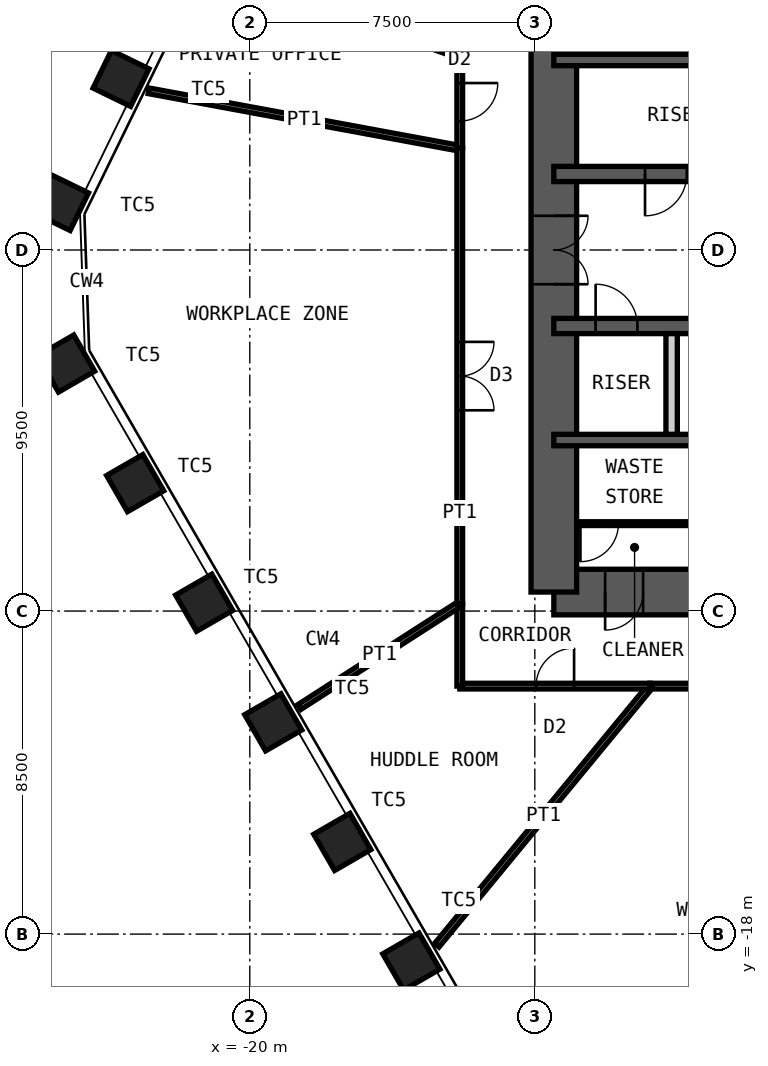
"""IFC4 building model, lengths in metres.
Left out: names, types, materials, properties, quantities, classifications, styles, units other than length and angle.
Written with IfcOpenShell. Run it as: python <this file> out.ifc"""

import sys

from ifc_helpers import new_model, si_unit, direction, frame, frame_2d, origin, origin_2d, place, context, subcontext, project, spatial, rectangle, hollow_rectangle, extrude, element, fill, save


model = new_model("IFC4")
c1 = context("Model", 3, precision=1e-05, world=origin(), true_north=direction((0.0, 1.0)))
c2 = subcontext(c1, "Body", "Model", "MODEL_VIEW")
j1 = project(units=[si_unit("LENGTHUNIT", "METRE"), si_unit("PLANEANGLEUNIT", "RADIAN")], contexts=[c1])
p1 = place(None, origin())
s1 = spatial("IfcSite", under=j1, at=p1, CompositionType="ELEMENT")
p2 = place(p1, origin())
s2 = spatial("IfcBuilding", under=s1, at=p2, CompositionType="ELEMENT")
p3 = place(p2, frame((0.0, 0.0, 188.8)))
s3 = spatial("IfcBuildingStorey", under=s2, at=p3, CompositionType="ELEMENT", Elevation=188.8)
for number, where, z_axis, x_axis in (
    (1, (-15.749, -18.721, 0.0), (0.0, 0.0, 1.0), (0.5, -0.866, 0.0)),
    (2, (-17.566, -15.574, 0.0), (0.0, 0.0, 1.0), (0.5, -0.866, 0.0)),
    (3, (-19.383, -12.428, 0.0), (0.0, 0.0, 1.0), (0.5, -0.866, 0.0)),
    (4, (-21.2, -9.281, 0.0), (0.0, 0.0, 1.0), (0.5, -0.866, 0.0)),
    (5, (-23.016, -6.134, 0.0), (0.0, 0.0, 1.0), (0.5, -0.866, 0.0)),
    (6, (-24.833, -2.988, 0.0), (0.0, 0.0, 1.0), (0.5, -0.866, 0.0)),
    (7, (-24.981, 1.248, 0.0), (0.0, 0.0, 1.0), (-0.438, -0.899, 0.0)),
    (8, (-23.388, 4.514, 0.0), (0.0, 0.0, 1.0), (-0.438, -0.899, 0.0)),
):
    element("IfcColumn", number, at=place(p3, frame(where, z_axis=z_axis, x_axis=x_axis)), inside=s3, PredefinedType="COLUMN", context=c2, shape_type="SweptSolid", body=[
        extrude(hollow_rectangle(XDim=1.1, YDim=1.1, WallThickness=0.07, at=origin_2d()), origin(), (0.0, 0.0, 1.0), 4.2),
    ])
p4 = place(p3, frame((-12.0, -9.0, 0.0), z_axis=(0.0, 0.0, 1.0), x_axis=(1.0, 0.0, 0.0)))
e9 = element("IfcWall", 9, at=p4, inside=s3, PredefinedType="SHEAR", context=c2, shape_type="SweptSolid", body=[
    extrude(rectangle(XDim=24.0, YDim=1.2, at=frame_2d((12.0, 0.0))), origin(), (0.0, 0.0, 1.0), 4.2),
])
p5 = place(p4, frame((1.35, 0.0, 0.0)))
e10 = element("IfcOpeningElement", 10, at=p5, cuts=e9, PredefinedType="OPENING", context=c2, shape_type="SweptSolid", body=[
    extrude(rectangle(XDim=1.0, YDim=2.1, at=frame_2d((0.5, 1.05))), frame((0.0, 0.61, 0.0), z_axis=(0.0, -1.0, 0.0), x_axis=(1.0, 0.0, 0.0)), (0.0, 0.0, 1.0), 1.22),
])
p6 = place(p4, frame((5.325, 0.0, 0.0)))
e11 = element("IfcOpeningElement", 11, at=p6, cuts=e9, PredefinedType="OPENING", context=c2, shape_type="SweptSolid", body=[
    extrude(rectangle(XDim=1.15, YDim=2.1, at=frame_2d((0.575, 1.05))), frame((0.0, 0.61, 0.0), z_axis=(0.0, -1.0, 0.0), x_axis=(1.0, 0.0, 0.0)), (0.0, 0.0, 1.0), 1.22),
])
p7 = place(p4, frame((12.6, 0.0, 0.0)))
e12 = element("IfcOpeningElement", 12, at=p7, cuts=e9, PredefinedType="OPENING", context=c2, shape_type="SweptSolid", body=[
    extrude(rectangle(XDim=1.0, YDim=2.1, at=frame_2d((0.5, 1.05))), frame((0.0, 0.61, 0.0), z_axis=(0.0, -1.0, 0.0), x_axis=(1.0, 0.0, 0.0)), (0.0, 0.0, 1.0), 1.22),
])
p8 = place(p3, frame((-12.0, -9.0, 0.0), z_axis=(0.0, 0.0, 1.0), x_axis=(0.0, 1.0, 0.0)))
e13 = element("IfcWall", 13, at=p8, inside=s3, PredefinedType="SHEAR", context=c2, shape_type="SweptSolid", body=[
    extrude(rectangle(XDim=18.0, YDim=1.2, at=frame_2d((9.0, 0.0))), origin(), (0.0, 0.0, 1.0), 4.2),
])
p9 = place(p8, frame((8.1, 0.0, 0.0)))
e14 = element("IfcOpeningElement", 14, at=p9, cuts=e13, PredefinedType="OPENING", context=c2, shape_type="SweptSolid", body=[
    extrude(rectangle(XDim=1.8, YDim=2.1, at=frame_2d((0.9, 1.05))), frame((0.0, 0.61, 0.0), z_axis=(0.0, -1.0, 0.0), x_axis=(1.0, 0.0, 0.0)), (0.0, 0.0, 1.0), 1.22),
])
p10 = place(p3, frame((-12.0, 5.0, 0.0), z_axis=(0.0, 0.0, 1.0), x_axis=(1.0, 0.0, 0.0)))
e15 = element("IfcWall", 15, at=p10, inside=s3, PredefinedType="SHEAR", context=c2, shape_type="SweptSolid", body=[
    extrude(rectangle(XDim=24.0, YDim=0.3, at=frame_2d((12.0, 0.0))), origin(), (0.0, 0.0, 1.0), 4.2),
])
p11 = place(p3, frame((-12.0, 2.0, 0.0), z_axis=(0.0, 0.0, 1.0), x_axis=(1.0, 0.0, 0.0)))
e16 = element("IfcWall", 16, at=p11, inside=s3, PredefinedType="SHEAR", context=c2, shape_type="SweptSolid", body=[
    extrude(rectangle(XDim=24.0, YDim=0.4, at=frame_2d((12.0, 0.0))), origin(), (0.0, 0.0, 1.0), 4.2),
])
p12 = place(p11, frame((2.4, 0.0, 0.0)))
e17 = element("IfcOpeningElement", 17, at=p12, cuts=e16, PredefinedType="OPENING", context=c2, shape_type="SweptSolid", body=[
    extrude(rectangle(XDim=1.1, YDim=2.1, at=frame_2d((0.55, 1.05))), frame((0.0, 0.21, 0.0), z_axis=(0.0, -1.0, 0.0), x_axis=(1.0, 0.0, 0.0)), (0.0, 0.0, 1.0), 0.42),
])
p13 = place(p11, frame((22.0, 0.0, 0.0)))
e18 = element("IfcOpeningElement", 18, at=p13, cuts=e16, PredefinedType="OPENING", context=c2, shape_type="SweptSolid", body=[
    extrude(rectangle(XDim=1.1, YDim=2.1, at=frame_2d((0.55, 1.05))), frame((0.0, 0.21, 0.0), z_axis=(0.0, -1.0, 0.0), x_axis=(1.0, 0.0, 0.0)), (0.0, 0.0, 1.0), 0.42),
])
p14 = place(p11, frame((10.15, 0.0, 0.0)))
e19 = element("IfcOpeningElement", 19, at=p14, cuts=e16, PredefinedType="OPENING", context=c2, shape_type="SweptSolid", body=[
    extrude(rectangle(XDim=1.0, YDim=2.1, at=frame_2d((0.5, 1.05))), frame((0.0, 0.21, 0.0), z_axis=(0.0, -1.0, 0.0), x_axis=(1.0, 0.0, 0.0)), (0.0, 0.0, 1.0), 0.42),
])
p15 = place(p11, frame((6.9, 0.0, 0.0)))
e20 = element("IfcOpeningElement", 20, at=p15, cuts=e16, PredefinedType="OPENING", context=c2, shape_type="SweptSolid", body=[
    extrude(rectangle(XDim=1.0, YDim=2.1, at=frame_2d((0.5, 1.05))), frame((0.0, 0.21, 0.0), z_axis=(0.0, -1.0, 0.0), x_axis=(1.0, 0.0, 0.0)), (0.0, 0.0, 1.0), 0.42),
])
p16 = place(p11, frame((13.35, 0.0, 0.0)))
e21 = element("IfcOpeningElement", 21, at=p16, cuts=e16, PredefinedType="OPENING", context=c2, shape_type="SweptSolid", body=[
    extrude(rectangle(XDim=1.1, YDim=2.4, at=frame_2d((0.55, 1.2))), frame((0.0, 0.21, 0.0), z_axis=(0.0, -1.0, 0.0), x_axis=(1.0, 0.0, 0.0)), (0.0, 0.0, 1.0), 0.42),
])
p17 = place(p11, frame((16.15, 0.0, 0.0)))
e22 = element("IfcOpeningElement", 22, at=p17, cuts=e16, PredefinedType="OPENING", context=c2, shape_type="SweptSolid", body=[
    extrude(rectangle(XDim=1.1, YDim=2.4, at=frame_2d((0.55, 1.2))), frame((0.0, 0.21, 0.0), z_axis=(0.0, -1.0, 0.0), x_axis=(1.0, 0.0, 0.0)), (0.0, 0.0, 1.0), 0.42),
])
p18 = place(p11, frame((18.95, 0.0, 0.0)))
e23 = element("IfcOpeningElement", 23, at=p18, cuts=e16, PredefinedType="OPENING", context=c2, shape_type="SweptSolid", body=[
    extrude(rectangle(XDim=1.1, YDim=2.4, at=frame_2d((0.55, 1.2))), frame((0.0, 0.21, 0.0), z_axis=(0.0, -1.0, 0.0), x_axis=(1.0, 0.0, 0.0)), (0.0, 0.0, 1.0), 0.42),
])
p19 = place(p3, frame((-12.0, -2.0, 0.0), z_axis=(0.0, 0.0, 1.0), x_axis=(1.0, 0.0, 0.0)))
e24 = element("IfcWall", 24, at=p19, inside=s3, PredefinedType="SHEAR", context=c2, shape_type="SweptSolid", body=[
    extrude(rectangle(XDim=24.0, YDim=0.4, at=frame_2d((12.0, 0.0))), origin(), (0.0, 0.0, 1.0), 4.2),
])
p20 = place(p19, frame((1.1, 0.0, 0.0)))
e25 = element("IfcOpeningElement", 25, at=p20, cuts=e24, PredefinedType="OPENING", context=c2, shape_type="SweptSolid", body=[
    extrude(rectangle(XDim=1.1, YDim=2.1, at=frame_2d((0.55, 1.05))), frame((0.0, 0.21, 0.0), z_axis=(0.0, -1.0, 0.0), x_axis=(1.0, 0.0, 0.0)), (0.0, 0.0, 1.0), 0.42),
])
p21 = place(p19, frame((13.55, 0.0, 0.0)))
e26 = element("IfcOpeningElement", 26, at=p21, cuts=e24, PredefinedType="OPENING", context=c2, shape_type="SweptSolid", body=[
    extrude(rectangle(XDim=1.1, YDim=2.1, at=frame_2d((0.55, 1.05))), frame((0.0, 0.21, 0.0), z_axis=(0.0, -1.0, 0.0), x_axis=(1.0, 0.0, 0.0)), (0.0, 0.0, 1.0), 0.42),
])
p22 = place(p19, frame((20.7, 0.0, 0.0)))
e27 = element("IfcOpeningElement", 27, at=p22, cuts=e24, PredefinedType="OPENING", context=c2, shape_type="SweptSolid", body=[
    extrude(rectangle(XDim=1.1, YDim=2.1, at=frame_2d((0.55, 1.05))), frame((0.0, 0.21, 0.0), z_axis=(0.0, -1.0, 0.0), x_axis=(1.0, 0.0, 0.0)), (0.0, 0.0, 1.0), 0.42),
])
p23 = place(p19, frame((4.0, 0.0, 0.0)))
e28 = element("IfcOpeningElement", 28, at=p23, cuts=e24, PredefinedType="OPENING", context=c2, shape_type="SweptSolid", body=[
    extrude(rectangle(XDim=1.0, YDim=2.1, at=frame_2d((0.5, 1.05))), frame((0.0, 0.21, 0.0), z_axis=(0.0, -1.0, 0.0), x_axis=(1.0, 0.0, 0.0)), (0.0, 0.0, 1.0), 0.42),
])
p24 = place(p19, frame((6.8, 0.0, 0.0)))
e29 = element("IfcOpeningElement", 29, at=p24, cuts=e24, PredefinedType="OPENING", context=c2, shape_type="SweptSolid", body=[
    extrude(rectangle(XDim=1.0, YDim=2.1, at=frame_2d((0.5, 1.05))), frame((0.0, 0.21, 0.0), z_axis=(0.0, -1.0, 0.0), x_axis=(1.0, 0.0, 0.0)), (0.0, 0.0, 1.0), 0.42),
])
p25 = place(p3, frame((-12.0, -5.0, 0.0), z_axis=(0.0, 0.0, 1.0), x_axis=(1.0, 0.0, 0.0)))
e30 = element("IfcWall", 30, at=p25, inside=s3, PredefinedType="SHEAR", context=c2, shape_type="SweptSolid", body=[
    extrude(rectangle(XDim=24.0, YDim=0.3, at=frame_2d((12.0, 0.0))), origin(), (0.0, 0.0, 1.0), 4.2),
])
p26 = place(p3, frame((-8.9, -4.85, 0.0), z_axis=(0.0, 0.0, 1.0), x_axis=(0.0, 1.0, 0.0)))
e31 = element("IfcWall", 31, at=p26, inside=s3, PredefinedType="PARTITIONING", context=c2, shape_type="SweptSolid", body=[
    extrude(rectangle(XDim=2.65, YDim=0.3, at=frame_2d((1.325, 0.0))), origin(), (0.0, 0.0, 1.0), 3.98),
])
p27 = place(p3, frame((-11.4, -7.2, 0.0), z_axis=(0.0, 0.0, 1.0), x_axis=(1.0, 0.0, 0.0)))
e32 = element("IfcWall", 32, at=p27, inside=s3, PredefinedType="PARTITIONING", context=c2, shape_type="SweptSolid", body=[
    extrude(rectangle(XDim=3.05, YDim=0.1, at=frame_2d((1.525, 0.0))), origin(), (0.0, 0.0, 1.0), 3.98),
])
p28 = place(p27, frame((0.1, 0.0, 0.0)))
e33 = element("IfcOpeningElement", 33, at=p28, cuts=e32, PredefinedType="OPENING", context=c2, shape_type="SweptSolid", body=[
    extrude(rectangle(XDim=1.0, YDim=2.4, at=frame_2d((0.5, 1.2))), frame((0.0, 0.06, 0.0), z_axis=(0.0, -1.0, 0.0), x_axis=(1.0, 0.0, 0.0)), (0.0, 0.0, 1.0), 0.12),
])
p29 = place(p3, frame((-22.661, 4.189, 0.0), z_axis=(0.0, 0.0, 1.0), x_axis=(0.983345347199, -0.181746879316, 0.0)))
e34 = element("IfcWall", 34, at=p29, inside=s3, PredefinedType="PARTITIONING", context=c2, shape_type="SweptSolid", body=[
    extrude(rectangle(XDim=8.324, YDim=0.15, at=frame_2d((4.162, 0.0))), origin(), (0.0, 0.0, 1.0), 3.43),
])
p30 = place(p3, frame((-14.475, 2.676, 0.0), z_axis=(0.0, 0.0, 1.0), x_axis=(0.0, 1.0, 0.0)))
e35 = element("IfcWall", 35, at=p30, inside=s3, PredefinedType="PARTITIONING", context=c2, shape_type="SweptSolid", body=[
    extrude(rectangle(XDim=2.435, YDim=0.15, at=frame_2d((1.217, 0.0))), origin(), (0.0, 0.0, 1.0), 4.03),
])
p31 = place(p30, frame((0.717, 0.0, 0.0)))
e36 = element("IfcOpeningElement", 36, at=p31, cuts=e35, PredefinedType="OPENING", context=c2, shape_type="SweptSolid", body=[
    extrude(rectangle(XDim=1.0, YDim=2.4, at=frame_2d((0.5, 1.2))), frame((0.0, 0.085, 0.0), z_axis=(0.0, -1.0, 0.0), x_axis=(1.0, 0.0, 0.0)), (0.0, 0.0, 1.0), 0.17),
])
p32 = place(p3, frame((-21.072, 7.439, 0.0), z_axis=(0.0, 0.0, 1.0), x_axis=(0.94295553867, -0.332918686907, 0.0)))
e37 = element("IfcWall", 37, at=p32, inside=s3, PredefinedType="PARTITIONING", context=c2, shape_type="SweptSolid", body=[
    extrude(rectangle(XDim=6.996, YDim=0.15, at=frame_2d((3.498, 0.0))), origin(), (0.0, 0.0, 1.0), 3.43),
])
p33 = place(p3, frame((-14.475, 5.11, 0.0), z_axis=(0.0, 0.0, 1.0), x_axis=(0.0, 1.0, 0.0)))
e38 = element("IfcWall", 38, at=p33, inside=s3, PredefinedType="PARTITIONING", context=c2, shape_type="SweptSolid", body=[
    extrude(rectangle(XDim=2.831, YDim=0.15, at=frame_2d((1.416, 0.0))), origin(), (0.0, 0.0, 1.0), 4.03),
])
p34 = place(p33, frame((0.916, 0.0, 0.0)))
e39 = element("IfcOpeningElement", 39, at=p34, cuts=e38, PredefinedType="OPENING", context=c2, shape_type="SweptSolid", body=[
    extrude(rectangle(XDim=1.0, YDim=2.4, at=frame_2d((0.5, 1.2))), frame((0.0, 0.085, 0.0), z_axis=(0.0, -1.0, 0.0), x_axis=(1.0, 0.0, 0.0)), (0.0, 0.0, 1.0), 0.17),
])
p35 = place(p3, frame((4.07, -11.475, 0.0), z_axis=(0.0, 0.0, 1.0), x_axis=(-1.0, 0.0, 0.0)))
e40 = element("IfcWall", 40, at=p35, inside=s3, PredefinedType="PARTITIONING", context=c2, shape_type="SweptSolid", body=[
    extrude(rectangle(XDim=13.528, YDim=0.15, at=frame_2d((6.764, 0.0))), origin(), (0.0, 0.0, 1.0), 4.03),
])
p36 = place(p35, frame((5.864, 0.0, 0.0)))
e41 = element("IfcOpeningElement", 41, at=p36, cuts=e40, PredefinedType="OPENING", context=c2, shape_type="SweptSolid", body=[
    extrude(rectangle(XDim=1.8, YDim=2.4, at=frame_2d((0.9, 1.2))), frame((0.0, 0.085, 0.0), z_axis=(0.0, -1.0, 0.0), x_axis=(1.0, 0.0, 0.0)), (0.0, 0.0, 1.0), 0.17),
])
p37 = place(p3, frame((-15.08, -18.294, 0.0), z_axis=(0.0, 0.0, 1.0), x_axis=(0.636052894953, 0.771645459277, 0.0)))
e42 = element("IfcWall", 42, at=p37, inside=s3, PredefinedType="PARTITIONING", context=c2, shape_type="SweptSolid", body=[
    extrude(rectangle(XDim=8.837, YDim=0.15, at=frame_2d((4.418, 0.0))), origin(), (0.0, 0.0, 1.0), 3.43),
])
p38 = place(p3, frame((-9.459, -11.475, 0.0), z_axis=(0.0, 0.0, 1.0), x_axis=(-1.0, 0.0, 0.0)))
e43 = element("IfcWall", 43, at=p38, inside=s3, PredefinedType="PARTITIONING", context=c2, shape_type="SweptSolid", body=[
    extrude(rectangle(XDim=5.016, YDim=0.15, at=frame_2d((2.508, 0.0))), origin(), (0.0, 0.0, 1.0), 4.03),
])
p39 = place(p38, frame((2.008, 0.0, 0.0)))
e44 = element("IfcOpeningElement", 44, at=p39, cuts=e43, PredefinedType="OPENING", context=c2, shape_type="SweptSolid", body=[
    extrude(rectangle(XDim=1.0, YDim=2.4, at=frame_2d((0.5, 1.2))), frame((0.0, 0.085, 0.0), z_axis=(0.0, -1.0, 0.0), x_axis=(1.0, 0.0, 0.0)), (0.0, 0.0, 1.0), 0.17),
])
p40 = place(p3, frame((-14.475, -11.475, 0.0), z_axis=(0.0, 0.0, 1.0), x_axis=(0.0, 1.0, 0.0)))
e45 = element("IfcWall", 45, at=p40, inside=s3, PredefinedType="PARTITIONING", context=c2, shape_type="SweptSolid", body=[
    extrude(rectangle(XDim=2.164, YDim=0.15, at=frame_2d((1.082, 0.0))), origin(), (0.0, 0.0, 1.0), 4.03),
])
p41 = place(p3, frame((-18.693, -12.024, 0.0), z_axis=(0.0, 0.0, 1.0), x_axis=(0.841031335058, 0.540986407824, 0.0)))
e46 = element("IfcWall", 46, at=p41, inside=s3, PredefinedType="PARTITIONING", context=c2, shape_type="SweptSolid", body=[
    extrude(rectangle(XDim=5.015, YDim=0.15, at=frame_2d((2.507, 0.0))), origin(), (0.0, 0.0, 1.0), 3.43),
])
p42 = place(p3, frame((-14.475, -9.311, 0.0), z_axis=(0.0, 0.0, 1.0), x_axis=(0.0, 1.0, 0.0)))
e47 = element("IfcWall", 47, at=p42, inside=s3, PredefinedType="PARTITIONING", context=c2, shape_type="SweptSolid", body=[
    extrude(rectangle(XDim=11.987, YDim=0.15, at=frame_2d((5.993, 0.0))), origin(), (0.0, 0.0, 1.0), 4.03),
])
p43 = place(p42, frame((5.093, 0.0, 0.0)))
e48 = element("IfcOpeningElement", 48, at=p43, cuts=e47, PredefinedType="OPENING", context=c2, shape_type="SweptSolid", body=[
    extrude(rectangle(XDim=1.8, YDim=2.4, at=frame_2d((0.9, 1.2))), frame((0.0, 0.085, 0.0), z_axis=(0.0, -1.0, 0.0), x_axis=(1.0, 0.0, 0.0)), (0.0, 0.0, 1.0), 0.17),
])
p44 = place(p5, origin())
e49 = element("IfcDoor", 49, at=p44, inside=s3, OperationType="SINGLE_SWING_LEFT", PredefinedType="DOOR", context=c2, shape_type="SweptSolid", body=[
    extrude(rectangle(XDim=1.0, YDim=2.1, at=frame_2d((0.5, 1.05))), frame((0.0, 0.025, 0.0), z_axis=(0.0, -1.0, 0.0), x_axis=(1.0, 0.0, 0.0)), (0.0, 0.0, 1.0), 0.05),
])
fill(e10, e49)
p45 = place(p12, origin())
e50 = element("IfcDoor", 50, at=p45, inside=s3, OperationType="SINGLE_SWING_LEFT", PredefinedType="DOOR", context=c2, shape_type="SweptSolid", body=[
    extrude(rectangle(XDim=1.1, YDim=2.1, at=frame_2d((0.55, 1.05))), frame((0.0, 0.025, 0.0), z_axis=(0.0, -1.0, 0.0), x_axis=(1.0, 0.0, 0.0)), (0.0, 0.0, 1.0), 0.05),
])
fill(e17, e50)
p46 = place(p20, origin())
e51 = element("IfcDoor", 51, at=p46, inside=s3, OperationType="SINGLE_SWING_RIGHT", PredefinedType="DOOR", context=c2, shape_type="SweptSolid", body=[
    extrude(rectangle(XDim=1.1, YDim=2.1, at=frame_2d((0.55, 1.05))), frame((0.0, 0.025, 0.0), z_axis=(0.0, -1.0, 0.0), x_axis=(1.0, 0.0, 0.0)), (0.0, 0.0, 1.0), 0.05),
])
fill(e25, e51)
p47 = place(p9, origin())
e52 = element("IfcDoor", 52, at=p47, inside=s3, OperationType="DOUBLE_DOOR_DOUBLE_SWING", PredefinedType="DOOR", context=c2, shape_type="SweptSolid", body=[
    extrude(rectangle(XDim=1.8, YDim=2.1, at=frame_2d((0.9, 1.05))), frame((0.0, 0.025, 0.0), z_axis=(0.0, -1.0, 0.0), x_axis=(1.0, 0.0, 0.0)), (0.0, 0.0, 1.0), 0.05),
])
fill(e14, e52)
p48 = place(p28, origin())
e53 = element("IfcDoor", 53, at=p48, inside=s3, OperationType="SINGLE_SWING_LEFT", PredefinedType="DOOR", context=c2, shape_type="SweptSolid", body=[
    extrude(rectangle(XDim=1.0, YDim=2.4, at=frame_2d((0.5, 1.2))), frame((0.0, 0.025, 0.0), z_axis=(0.0, -1.0, 0.0), x_axis=(1.0, 0.0, 0.0)), (0.0, 0.0, 1.0), 0.05),
])
fill(e33, e53)
p49 = place(p31, origin())
e54 = element("IfcDoor", 54, at=p49, inside=s3, OperationType="SINGLE_SWING_RIGHT", PredefinedType="DOOR", context=c2, shape_type="SweptSolid", body=[
    extrude(rectangle(XDim=1.0, YDim=2.4, at=frame_2d((0.5, 1.2))), frame((0.0, 0.025, 0.0), z_axis=(0.0, -1.0, 0.0), x_axis=(1.0, 0.0, 0.0)), (0.0, 0.0, 1.0), 0.05),
])
fill(e36, e54)
p50 = place(p39, origin())
e55 = element("IfcDoor", 55, at=p50, inside=s3, OperationType="SINGLE_SWING_LEFT", PredefinedType="DOOR", context=c2, shape_type="SweptSolid", body=[
    extrude(rectangle(XDim=1.0, YDim=2.4, at=frame_2d((0.5, 1.2))), frame((0.0, 0.025, 0.0), z_axis=(0.0, -1.0, 0.0), x_axis=(1.0, 0.0, 0.0)), (0.0, 0.0, 1.0), 0.05),
])
fill(e44, e55)
p51 = place(p43, origin())
e56 = element("IfcDoor", 56, at=p51, inside=s3, OperationType="DOUBLE_DOOR_DOUBLE_SWING", PredefinedType="DOOR", context=c2, shape_type="SweptSolid", body=[
    extrude(rectangle(XDim=1.8, YDim=2.4, at=frame_2d((0.9, 1.2))), frame((0.0, 0.025, 0.0), z_axis=(0.0, -1.0, 0.0), x_axis=(1.0, 0.0, 0.0)), (0.0, 0.0, 1.0), 0.05),
])
fill(e48, e56)
save(model, sys.argv[1])
